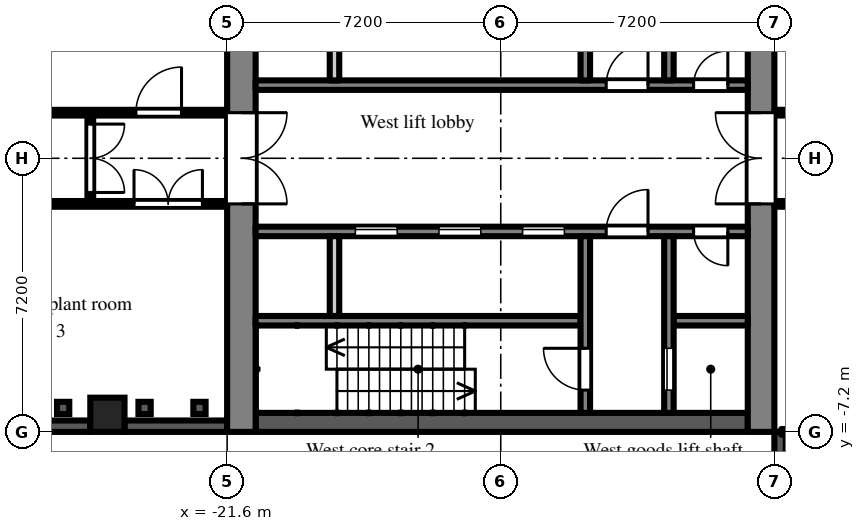
"""IFC4 building model, lengths in metres.
Left out: names, types, materials, properties, quantities, classifications, styles, units other than length and angle.
Written with IfcOpenShell. Run it as: python <this file> out.ifc"""

import sys

from ifc_helpers import new_model, si_unit, direction, frame, frame_2d, origin, origin_2d, place, context, subcontext, project, spatial, rectangle, extrude, element, fill, save


model = new_model("IFC4")
c1 = context("Model", 3, precision=1e-05, world=origin(), true_north=direction((0.0, 1.0)))
c2 = subcontext(c1, "Body", "Model", "MODEL_VIEW")
j1 = project(units=[si_unit("LENGTHUNIT", "METRE"), si_unit("PLANEANGLEUNIT", "RADIAN")], contexts=[c1])
p1 = place(None, origin())
s1 = spatial("IfcSite", under=j1, at=p1, CompositionType="ELEMENT")
p2 = place(p1, origin())
s2 = spatial("IfcBuilding", under=s1, at=p2, CompositionType="ELEMENT")
p3 = place(p2, frame((0.0, 0.0, 111.9)))
s3 = spatial("IfcBuildingStorey", under=s2, at=p3, CompositionType="ELEMENT", Elevation=111.9)
p4 = place(p3, frame((-24.75, -6.75, 0.0), z_axis=(0.0, 0.0, 1.0), x_axis=(1.0, 0.0, 0.0)))
e1 = element("IfcColumn", 1, at=p4, inside=s3, PredefinedType="COLUMN", context=c2, shape_type="SweptSolid", body=[
    extrude(rectangle(XDim=0.9, YDim=0.9, at=origin_2d()), origin(), (0.0, 0.0, 1.0), 4.2),
])
p5 = place(p3, frame((-28.35, -7.05, 0.0), z_axis=(0.0, 0.0, 1.0), x_axis=(1.0, 0.0, 0.0)))
e2 = element("IfcWall", 2, at=p5, inside=s3, PredefinedType="SOLIDWALL", context=c2, shape_type="SweptSolid", body=[
    extrude(rectangle(XDim=3.15, YDim=0.3, at=frame_2d((1.575, 0.0))), origin(), (0.0, 0.0, 1.0), 3.4),
])
p6 = place(p3, frame((-24.3, -7.05, 0.0), z_axis=(0.0, 0.0, 1.0), x_axis=(1.0, 0.0, 0.0)))
e3 = element("IfcWall", 3, at=p6, inside=s3, PredefinedType="SOLIDWALL", context=c2, shape_type="SweptSolid", body=[
    extrude(rectangle(XDim=2.7, YDim=0.3, at=frame_2d((1.35, 0.0))), origin(), (0.0, 0.0, 1.0), 3.4),
])
p7 = place(p3, frame((-7.05, -7.2, 0.0), z_axis=(0.0, 0.0, 1.0), x_axis=(0.0, -1.0, 0.0)))
e4 = element("IfcWall", 4, at=p7, inside=s3, PredefinedType="SOLIDWALL", context=c2, shape_type="SweptSolid", body=[
    extrude(rectangle(XDim=7.2, YDim=0.3, at=frame_2d((3.6, 0.0))), origin(), (0.0, 0.0, 1.0), 3.8),
])
p8 = place(p3, frame((-7.55, -7.2, 0.0), z_axis=(0.0, 0.0, 1.0), x_axis=(0.0, 1.0, 0.0)))
e5 = element("IfcWall", 5, at=p8, inside=s3, PredefinedType="SHEAR", context=c2, shape_type="SweptSolid", body=[
    extrude(rectangle(XDim=14.4, YDim=0.7, at=frame_2d((7.2, 0.0))), origin(), (0.0, 0.0, 1.0), 3.8),
])
p9 = place(p8, frame((6.0, 0.0, 0.0)))
e6 = element("IfcOpeningElement", 6, at=p9, cuts=e5, PredefinedType="OPENING", context=c2, shape_type="SweptSolid", body=[
    extrude(rectangle(XDim=2.4, YDim=2.2, at=frame_2d((1.2, 1.1))), frame((0.0, 0.36, 0.0), z_axis=(0.0, -1.0, 0.0), x_axis=(1.0, 0.0, 0.0)), (0.0, 0.0, 1.0), 0.72),
])
p10 = place(p3, frame((-21.225, -7.2, 0.0), z_axis=(0.0, 0.0, 1.0), x_axis=(0.0, 1.0, 0.0)))
e7 = element("IfcWall", 7, at=p10, inside=s3, PredefinedType="SHEAR", context=c2, shape_type="SweptSolid", body=[
    extrude(rectangle(XDim=14.4, YDim=0.75, at=frame_2d((7.2, 0.0))), origin(), (0.0, 0.0, 1.0), 3.8),
])
p11 = place(p10, frame((6.0, 0.0, 0.0)))
e8 = element("IfcOpeningElement", 8, at=p11, cuts=e7, PredefinedType="OPENING", context=c2, shape_type="SweptSolid", body=[
    extrude(rectangle(XDim=2.4, YDim=2.2, at=frame_2d((1.2, 1.1))), frame((0.0, 0.385, 0.0), z_axis=(0.0, -1.0, 0.0), x_axis=(1.0, 0.0, 0.0)), (0.0, 0.0, 1.0), 0.77),
])
p12 = place(p3, frame((-7.9, 1.925, 0.0), z_axis=(0.0, 0.0, 1.0), x_axis=(-1.0, 0.0, 0.0)))
e9 = element("IfcWall", 9, at=p12, inside=s3, PredefinedType="SHEAR", context=c2, shape_type="SweptSolid", body=[
    extrude(rectangle(XDim=12.95, YDim=0.25, at=frame_2d((6.475, 0.0))), origin(), (0.0, 0.0, 1.0), 3.8),
])
p13 = place(p12, frame((0.525, 0.0, 0.0)))
e10 = element("IfcOpeningElement", 10, at=p13, cuts=e9, PredefinedType="OPENING", context=c2, shape_type="SweptSolid", body=[
    extrude(rectangle(XDim=0.9, YDim=2.1, at=frame_2d((0.45, 1.05))), frame((0.0, 0.135, 0.0), z_axis=(0.0, -1.0, 0.0), x_axis=(1.0, 0.0, 0.0)), (0.0, 0.0, 1.0), 0.27),
])
p14 = place(p12, frame((2.625, 0.0, 0.0)))
e11 = element("IfcOpeningElement", 11, at=p14, cuts=e9, PredefinedType="OPENING", context=c2, shape_type="SweptSolid", body=[
    extrude(rectangle(XDim=1.1, YDim=2.1, at=frame_2d((0.55, 1.05))), frame((0.0, 0.135, 0.0), z_axis=(0.0, -1.0, 0.0), x_axis=(1.0, 0.0, 0.0)), (0.0, 0.0, 1.0), 0.27),
])
p15 = place(p3, frame((-9.975, 2.05, 0.0), z_axis=(0.0, 0.0, 1.0), x_axis=(0.0, 1.0, 0.0)))
e12 = element("IfcWall", 12, at=p15, inside=s3, PredefinedType="SHEAR", context=c2, shape_type="SweptSolid", body=[
    extrude(rectangle(XDim=4.65, YDim=0.25, at=frame_2d((2.325, 0.0))), origin(), (0.0, 0.0, 1.0), 3.8),
])
p16 = place(p15, frame((2.95, 0.0, 0.0)))
e13 = element("IfcOpeningElement", 13, at=p16, cuts=e12, PredefinedType="OPENING", context=c2, shape_type="SweptSolid", body=[
    extrude(rectangle(XDim=1.1, YDim=2.1, at=frame_2d((0.55, 1.05))), frame((0.0, 0.135, 0.0), z_axis=(0.0, -1.0, 0.0), x_axis=(1.0, 0.0, 0.0)), (0.0, 0.0, 1.0), 0.27),
])
p17 = place(p3, frame((-12.175, 2.05, 0.0), z_axis=(0.0, 0.0, 1.0), x_axis=(0.0, 1.0, 0.0)))
e14 = element("IfcWall", 14, at=p17, inside=s3, PredefinedType="SHEAR", context=c2, shape_type="SweptSolid", body=[
    extrude(rectangle(XDim=4.65, YDim=0.25, at=frame_2d((2.325, 0.0))), origin(), (0.0, 0.0, 1.0), 3.8),
])
p18 = place(p17, frame((2.95, 0.0, 0.0)))
e15 = element("IfcOpeningElement", 15, at=p18, cuts=e14, PredefinedType="OPENING", context=c2, shape_type="SweptSolid", body=[
    extrude(rectangle(XDim=1.1, YDim=2.1, at=frame_2d((0.55, 1.05))), frame((0.0, 0.135, 0.0), z_axis=(0.0, -1.0, 0.0), x_axis=(1.0, 0.0, 0.0)), (0.0, 0.0, 1.0), 0.27),
])
p19 = place(p3, frame((-18.775, 2.05, 0.0), z_axis=(0.0, 0.0, 1.0), x_axis=(0.0, 1.0, 0.0)))
e16 = element("IfcWall", 16, at=p19, inside=s3, PredefinedType="PARTITIONING", context=c2, shape_type="SweptSolid", body=[
    extrude(rectangle(XDim=2.1, YDim=0.25, at=frame_2d((1.05, 0.0))), origin(), (0.0, 0.0, 1.0), 3.8),
])
p20 = place(p3, frame((-7.9, -6.95, 0.0), z_axis=(0.0, 0.0, 1.0), x_axis=(-1.0, 0.0, 0.0)))
e17 = element("IfcWall", 17, at=p20, inside=s3, PredefinedType="SHEAR", context=c2, shape_type="SweptSolid", body=[
    extrude(rectangle(XDim=12.95, YDim=0.5, at=frame_2d((6.475, 0.0))), origin(), (0.0, 0.0, 1.0), 3.8),
])
p21 = place(p3, frame((-7.9, -1.925, 0.0), z_axis=(0.0, 0.0, 1.0), x_axis=(-1.0, 0.0, 0.0)))
e18 = element("IfcWall", 18, at=p21, inside=s3, PredefinedType="SHEAR", context=c2, shape_type="SweptSolid", body=[
    extrude(rectangle(XDim=12.95, YDim=0.25, at=frame_2d((6.475, 0.0))), origin(), (0.0, 0.0, 1.0), 3.8),
])
p22 = place(p21, frame((4.825, 0.0, 0.0)))
e19 = element("IfcOpeningElement", 19, at=p22, cuts=e18, PredefinedType="OPENING", context=c2, shape_type="SweptSolid", body=[
    extrude(rectangle(XDim=1.1, YDim=2.1, at=frame_2d((0.55, 1.05))), frame((0.0, 0.135, 0.0), z_axis=(0.0, -1.0, 0.0), x_axis=(1.0, 0.0, 0.0)), (0.0, 0.0, 1.0), 0.27),
])
p23 = place(p21, frame((7.025, 0.0, 0.0)))
e20 = element("IfcOpeningElement", 20, at=p23, cuts=e18, PredefinedType="OPENING", context=c2, shape_type="SweptSolid", body=[
    extrude(rectangle(XDim=1.1, YDim=2.1, at=frame_2d((0.55, 1.05))), frame((0.0, 0.135, 0.0), z_axis=(0.0, -1.0, 0.0), x_axis=(1.0, 0.0, 0.0)), (0.0, 0.0, 1.0), 0.27),
])
p24 = place(p21, frame((9.225, 0.0, 0.0)))
e21 = element("IfcOpeningElement", 21, at=p24, cuts=e18, PredefinedType="OPENING", context=c2, shape_type="SweptSolid", body=[
    extrude(rectangle(XDim=1.1, YDim=2.1, at=frame_2d((0.55, 1.05))), frame((0.0, 0.135, 0.0), z_axis=(0.0, -1.0, 0.0), x_axis=(1.0, 0.0, 0.0)), (0.0, 0.0, 1.0), 0.27),
])
p25 = place(p21, frame((0.525, 0.0, 0.0)))
e22 = element("IfcOpeningElement", 22, at=p25, cuts=e18, PredefinedType="OPENING", context=c2, shape_type="SweptSolid", body=[
    extrude(rectangle(XDim=0.9, YDim=2.1, at=frame_2d((0.45, 1.05))), frame((0.0, 0.135, 0.0), z_axis=(0.0, -1.0, 0.0), x_axis=(1.0, 0.0, 0.0)), (0.0, 0.0, 1.0), 0.27),
])
p26 = place(p21, frame((2.625, 0.0, 0.0)))
e23 = element("IfcOpeningElement", 23, at=p26, cuts=e18, PredefinedType="OPENING", context=c2, shape_type="SweptSolid", body=[
    extrude(rectangle(XDim=1.1, YDim=2.1, at=frame_2d((0.55, 1.05))), frame((0.0, 0.135, 0.0), z_axis=(0.0, -1.0, 0.0), x_axis=(1.0, 0.0, 0.0)), (0.0, 0.0, 1.0), 0.27),
])
p27 = place(p3, frame((-7.9, -4.275, 0.0), z_axis=(0.0, 0.0, 1.0), x_axis=(-1.0, 0.0, 0.0)))
e24 = element("IfcWall", 24, at=p27, inside=s3, PredefinedType="SHEAR", context=c2, shape_type="SweptSolid", body=[
    extrude(rectangle(XDim=1.95, YDim=0.25, at=frame_2d((0.975, 0.0))), origin(), (0.0, 0.0, 1.0), 3.8),
])
p28 = place(p3, frame((-12.3, -4.275, 0.0), z_axis=(0.0, 0.0, 1.0), x_axis=(-1.0, 0.0, 0.0)))
e25 = element("IfcWall", 25, at=p28, inside=s3, PredefinedType="SHEAR", context=c2, shape_type="SweptSolid", body=[
    extrude(rectangle(XDim=8.55, YDim=0.25, at=frame_2d((4.275, 0.0))), origin(), (0.0, 0.0, 1.0), 3.8),
])
p29 = place(p3, frame((-9.975, -2.05, 0.0), z_axis=(0.0, 0.0, 1.0), x_axis=(0.0, -1.0, 0.0)))
e26 = element("IfcWall", 26, at=p29, inside=s3, PredefinedType="SHEAR", context=c2, shape_type="SweptSolid", body=[
    extrude(rectangle(XDim=4.65, YDim=0.25, at=frame_2d((2.325, 0.0))), origin(), (0.0, 0.0, 1.0), 3.8),
])
p30 = place(p29, frame((2.95, 0.0, 0.0)))
e27 = element("IfcOpeningElement", 27, at=p30, cuts=e26, PredefinedType="OPENING", context=c2, shape_type="SweptSolid", body=[
    extrude(rectangle(XDim=1.1, YDim=2.1, at=frame_2d((0.55, 1.05))), frame((0.0, 0.135, 0.0), z_axis=(0.0, -1.0, 0.0), x_axis=(1.0, 0.0, 0.0)), (0.0, 0.0, 1.0), 0.27),
])
p31 = place(p3, frame((-12.175, -2.05, 0.0), z_axis=(0.0, 0.0, 1.0), x_axis=(0.0, -1.0, 0.0)))
e28 = element("IfcWall", 28, at=p31, inside=s3, PredefinedType="SHEAR", context=c2, shape_type="SweptSolid", body=[
    extrude(rectangle(XDim=4.65, YDim=0.25, at=frame_2d((2.325, 0.0))), origin(), (0.0, 0.0, 1.0), 3.8),
])
p32 = place(p31, frame((2.95, 0.0, 0.0)))
e29 = element("IfcOpeningElement", 29, at=p32, cuts=e28, PredefinedType="OPENING", context=c2, shape_type="SweptSolid", body=[
    extrude(rectangle(XDim=1.1, YDim=2.1, at=frame_2d((0.55, 1.05))), frame((0.0, 0.135, 0.0), z_axis=(0.0, -1.0, 0.0), x_axis=(1.0, 0.0, 0.0)), (0.0, 0.0, 1.0), 0.27),
])
p33 = place(p3, frame((-18.775, -2.05, 0.0), z_axis=(0.0, 0.0, 1.0), x_axis=(0.0, -1.0, 0.0)))
e30 = element("IfcWall", 30, at=p33, inside=s3, PredefinedType="PARTITIONING", context=c2, shape_type="SweptSolid", body=[
    extrude(rectangle(XDim=2.1, YDim=0.25, at=frame_2d((1.05, 0.0))), origin(), (0.0, 0.0, 1.0), 3.8),
])
p34 = place(p3, frame((-36.5, -1.2, 0.0), z_axis=(0.0, 0.0, 1.0), x_axis=(1.0, 0.0, 0.0)))
e31 = element("IfcWall", 31, at=p34, inside=s3, PredefinedType="PARTITIONING", context=c2, shape_type="SweptSolid", body=[
    extrude(rectangle(XDim=14.9, YDim=0.15, at=frame_2d((7.45, 0.0))), origin(), (0.0, 0.0, 1.0), 3.8),
])
p35 = place(p34, frame((6.8, 0.0, 0.0)))
e32 = element("IfcOpeningElement", 32, at=p35, cuts=e31, PredefinedType="OPENING", context=c2, shape_type="SweptSolid", body=[
    extrude(rectangle(XDim=1.8, YDim=2.1, at=frame_2d((0.9, 1.05))), frame((0.0, 0.085, 0.0), z_axis=(0.0, -1.0, 0.0), x_axis=(1.0, 0.0, 0.0)), (0.0, 0.0, 1.0), 0.17),
])
p36 = place(p34, frame((12.45, 0.0, 0.0)))
e33 = element("IfcOpeningElement", 33, at=p36, cuts=e31, PredefinedType="OPENING", context=c2, shape_type="SweptSolid", body=[
    extrude(rectangle(XDim=1.8, YDim=2.1, at=frame_2d((0.9, 1.05))), frame((0.0, 0.085, 0.0), z_axis=(0.0, -1.0, 0.0), x_axis=(1.0, 0.0, 0.0)), (0.0, 0.0, 1.0), 0.17),
])
p37 = place(p34, frame((1.15, 0.0, 0.0)))
e34 = element("IfcOpeningElement", 34, at=p37, cuts=e31, PredefinedType="OPENING", context=c2, shape_type="SweptSolid", body=[
    extrude(rectangle(XDim=1.8, YDim=2.1, at=frame_2d((0.9, 1.05))), frame((0.0, 0.085, 0.0), z_axis=(0.0, -1.0, 0.0), x_axis=(1.0, 0.0, 0.0)), (0.0, 0.0, 1.0), 0.17),
])
p38 = place(p3, frame((-36.5, 1.2, 0.0), z_axis=(0.0, 0.0, 1.0), x_axis=(1.0, 0.0, 0.0)))
e35 = element("IfcWall", 35, at=p38, inside=s3, PredefinedType="PARTITIONING", context=c2, shape_type="SweptSolid", body=[
    extrude(rectangle(XDim=14.9, YDim=0.15, at=frame_2d((7.45, 0.0))), origin(), (0.0, 0.0, 1.0), 3.8),
])
p39 = place(p38, frame((4.75, 0.0, 0.0)))
e36 = element("IfcOpeningElement", 36, at=p39, cuts=e35, PredefinedType="OPENING", context=c2, shape_type="SweptSolid", body=[
    extrude(rectangle(XDim=0.9, YDim=2.1, at=frame_2d((0.45, 1.05))), frame((0.0, 0.085, 0.0), z_axis=(0.0, -1.0, 0.0), x_axis=(1.0, 0.0, 0.0)), (0.0, 0.0, 1.0), 0.17),
])
p40 = place(p38, frame((12.5, 0.0, 0.0)))
e37 = element("IfcOpeningElement", 37, at=p40, cuts=e35, PredefinedType="OPENING", context=c2, shape_type="SweptSolid", body=[
    extrude(rectangle(XDim=1.2, YDim=2.1, at=frame_2d((0.6, 1.05))), frame((0.0, 0.085, 0.0), z_axis=(0.0, -1.0, 0.0), x_axis=(1.0, 0.0, 0.0)), (0.0, 0.0, 1.0), 0.17),
])
p41 = place(p38, frame((1.15, 0.0, 0.0)))
e38 = element("IfcOpeningElement", 38, at=p41, cuts=e35, PredefinedType="OPENING", context=c2, shape_type="SweptSolid", body=[
    extrude(rectangle(XDim=1.8, YDim=2.1, at=frame_2d((0.9, 1.05))), frame((0.0, 0.085, 0.0), z_axis=(0.0, -1.0, 0.0), x_axis=(1.0, 0.0, 0.0)), (0.0, 0.0, 1.0), 0.17),
])
p42 = place(p3, frame((-25.2, -1.125, 0.0), z_axis=(0.0, 0.0, 1.0), x_axis=(0.0, 1.0, 0.0)))
e39 = element("IfcWall", 39, at=p42, inside=s3, PredefinedType="PARTITIONING", context=c2, shape_type="SweptSolid", body=[
    extrude(rectangle(XDim=2.25, YDim=0.15, at=frame_2d((1.125, 0.0))), origin(), (0.0, 0.0, 1.0), 3.8),
])
p43 = place(p42, frame((0.225, 0.0, 0.0)))
e40 = element("IfcOpeningElement", 40, at=p43, cuts=e39, PredefinedType="OPENING", context=c2, shape_type="SweptSolid", body=[
    extrude(rectangle(XDim=1.8, YDim=2.1, at=frame_2d((0.9, 1.05))), frame((0.0, 0.085, 0.0), z_axis=(0.0, -1.0, 0.0), x_axis=(1.0, 0.0, 0.0)), (0.0, 0.0, 1.0), 0.17),
])
p44 = place(p3, frame((-7.2, -1.2, 0.0), z_axis=(0.0, 0.0, 1.0), x_axis=(1.0, 0.0, 0.0)))
e41 = element("IfcWall", 41, at=p44, inside=s3, PredefinedType="PARTITIONING", context=c2, shape_type="SweptSolid", body=[
    extrude(rectangle(XDim=5.925, YDim=0.15, at=frame_2d((2.962, 0.0))), origin(), (0.0, 0.0, 1.0), 3.8),
])
p45 = place(p44, frame((0.85, 0.0, 0.0)))
e42 = element("IfcOpeningElement", 42, at=p45, cuts=e41, PredefinedType="OPENING", context=c2, shape_type="SweptSolid", body=[
    extrude(rectangle(XDim=1.2, YDim=2.1, at=frame_2d((0.6, 1.05))), frame((0.0, 0.085, 0.0), z_axis=(0.0, -1.0, 0.0), x_axis=(1.0, 0.0, 0.0)), (0.0, 0.0, 1.0), 0.17),
])
p46 = place(p3, frame((-7.2, 1.2, 0.0), z_axis=(0.0, 0.0, 1.0), x_axis=(1.0, 0.0, 0.0)))
e43 = element("IfcWall", 43, at=p46, inside=s3, PredefinedType="PARTITIONING", context=c2, shape_type="SweptSolid", body=[
    extrude(rectangle(XDim=5.925, YDim=0.15, at=frame_2d((2.962, 0.0))), origin(), (0.0, 0.0, 1.0), 3.8),
])
p47 = place(p46, frame((0.65, 0.0, 0.0)))
e44 = element("IfcOpeningElement", 44, at=p47, cuts=e43, PredefinedType="OPENING", context=c2, shape_type="SweptSolid", body=[
    extrude(rectangle(XDim=1.2, YDim=2.1, at=frame_2d((0.6, 1.05))), frame((0.0, 0.085, 0.0), z_axis=(0.0, -1.0, 0.0), x_axis=(1.0, 0.0, 0.0)), (0.0, 0.0, 1.0), 0.17),
])
p48 = place(p46, frame((4.925, 0.0, 0.0)))
e45 = element("IfcOpeningElement", 45, at=p48, cuts=e43, PredefinedType="OPENING", context=c2, shape_type="SweptSolid", body=[
    extrude(rectangle(XDim=0.9, YDim=2.1, at=frame_2d((0.45, 1.05))), frame((0.0, 0.085, 0.0), z_axis=(0.0, -1.0, 0.0), x_axis=(1.0, 0.0, 0.0)), (0.0, 0.0, 1.0), 0.17),
])
p49 = place(p3, frame((-7.02, -7.2, 0.0), z_axis=(0.0, 0.0, 1.0), x_axis=(1.0, 0.0, 0.0)))
e46 = element("IfcWall", 46, at=p49, inside=s3, PredefinedType="PARTITIONING", context=c2, shape_type="SweptSolid", body=[
    extrude(rectangle(XDim=3.27, YDim=0.15, at=frame_2d((1.635, 0.0))), origin(), (0.0, 0.0, 1.0), 3.4),
])
p50 = place(p22, origin())
e47 = element("IfcDoor", 47, at=p50, inside=s3, OperationType="SLIDING_TO_LEFT", PredefinedType="DOOR", context=c2, shape_type="SweptSolid", body=[
    extrude(rectangle(XDim=1.1, YDim=2.1, at=frame_2d((0.55, 1.05))), frame((0.0, 0.025, 0.0), z_axis=(0.0, -1.0, 0.0), x_axis=(1.0, 0.0, 0.0)), (0.0, 0.0, 1.0), 0.05),
])
fill(e19, e47)
p51 = place(p23, origin())
e48 = element("IfcDoor", 48, at=p51, inside=s3, OperationType="SLIDING_TO_LEFT", PredefinedType="DOOR", context=c2, shape_type="SweptSolid", body=[
    extrude(rectangle(XDim=1.1, YDim=2.1, at=frame_2d((0.55, 1.05))), frame((0.0, 0.025, 0.0), z_axis=(0.0, -1.0, 0.0), x_axis=(1.0, 0.0, 0.0)), (0.0, 0.0, 1.0), 0.05),
])
fill(e20, e48)
p52 = place(p24, origin())
e49 = element("IfcDoor", 49, at=p52, inside=s3, OperationType="SLIDING_TO_LEFT", PredefinedType="DOOR", context=c2, shape_type="SweptSolid", body=[
    extrude(rectangle(XDim=1.1, YDim=2.1, at=frame_2d((0.55, 1.05))), frame((0.0, 0.025, 0.0), z_axis=(0.0, -1.0, 0.0), x_axis=(1.0, 0.0, 0.0)), (0.0, 0.0, 1.0), 0.05),
])
fill(e21, e49)
p53 = place(p30, origin())
e50 = element("IfcDoor", 50, at=p53, inside=s3, OperationType="SLIDING_TO_LEFT", PredefinedType="DOOR", context=c2, shape_type="SweptSolid", body=[
    extrude(rectangle(XDim=1.1, YDim=2.1, at=frame_2d((0.55, 1.05))), frame((0.0, 0.025, 0.0), z_axis=(0.0, -1.0, 0.0), x_axis=(1.0, 0.0, 0.0)), (0.0, 0.0, 1.0), 0.05),
])
fill(e27, e50)
p54 = place(p32, frame((1.1, 0.0, 0.0), z_axis=(0.0, 0.0, 1.0), x_axis=(-1.0, 0.0, 0.0)))
e51 = element("IfcDoor", 51, at=p54, inside=s3, OperationType="SINGLE_SWING_RIGHT", PredefinedType="DOOR", context=c2, shape_type="SweptSolid", body=[
    extrude(rectangle(XDim=1.1, YDim=2.1, at=frame_2d((0.55, 1.05))), frame((0.0, 0.025, 0.0), z_axis=(0.0, -1.0, 0.0), x_axis=(1.0, 0.0, 0.0)), (0.0, 0.0, 1.0), 0.05),
])
fill(e29, e51)
p55 = place(p13, frame((0.9, 0.0, 0.0), z_axis=(0.0, 0.0, 1.0), x_axis=(-1.0, 0.0, 0.0)))
e52 = element("IfcDoor", 52, at=p55, inside=s3, OperationType="SINGLE_SWING_RIGHT", PredefinedType="DOOR", context=c2, shape_type="SweptSolid", body=[
    extrude(rectangle(XDim=0.9, YDim=2.1, at=frame_2d((0.45, 1.05))), frame((0.0, 0.025, 0.0), z_axis=(0.0, -1.0, 0.0), x_axis=(1.0, 0.0, 0.0)), (0.0, 0.0, 1.0), 0.05),
])
fill(e10, e52)
p56 = place(p25, origin())
e53 = element("IfcDoor", 53, at=p56, inside=s3, OperationType="SINGLE_SWING_LEFT", PredefinedType="DOOR", context=c2, shape_type="SweptSolid", body=[
    extrude(rectangle(XDim=0.9, YDim=2.1, at=frame_2d((0.45, 1.05))), frame((0.0, 0.025, 0.0), z_axis=(0.0, -1.0, 0.0), x_axis=(1.0, 0.0, 0.0)), (0.0, 0.0, 1.0), 0.05),
])
fill(e22, e53)
p57 = place(p14, frame((1.1, 0.0, 0.0), z_axis=(0.0, 0.0, 1.0), x_axis=(-1.0, 0.0, 0.0)))
e54 = element("IfcDoor", 54, at=p57, inside=s3, OperationType="SINGLE_SWING_RIGHT", PredefinedType="DOOR", context=c2, shape_type="SweptSolid", body=[
    extrude(rectangle(XDim=1.1, YDim=2.1, at=frame_2d((0.55, 1.05))), frame((0.0, 0.025, 0.0), z_axis=(0.0, -1.0, 0.0), x_axis=(1.0, 0.0, 0.0)), (0.0, 0.0, 1.0), 0.05),
])
fill(e11, e54)
p58 = place(p26, frame((1.1, 0.0, 0.0), z_axis=(0.0, 0.0, 1.0), x_axis=(-1.0, 0.0, 0.0)))
e55 = element("IfcDoor", 55, at=p58, inside=s3, OperationType="SINGLE_SWING_RIGHT", PredefinedType="DOOR", context=c2, shape_type="SweptSolid", body=[
    extrude(rectangle(XDim=1.1, YDim=2.1, at=frame_2d((0.55, 1.05))), frame((0.0, 0.025, 0.0), z_axis=(0.0, -1.0, 0.0), x_axis=(1.0, 0.0, 0.0)), (0.0, 0.0, 1.0), 0.05),
])
fill(e23, e55)
p59 = place(p9, origin())
e56 = element("IfcDoor", 56, at=p59, inside=s3, OperationType="DOUBLE_DOOR_DOUBLE_SWING", PredefinedType="DOOR", context=c2, shape_type="SweptSolid", body=[
    extrude(rectangle(XDim=2.4, YDim=2.2, at=frame_2d((1.2, 1.1))), frame((0.0, 0.025, 0.0), z_axis=(0.0, -1.0, 0.0), x_axis=(1.0, 0.0, 0.0)), (0.0, 0.0, 1.0), 0.05),
])
fill(e6, e56)
p60 = place(p11, frame((2.4, 0.0, 0.0), z_axis=(0.0, 0.0, 1.0), x_axis=(-1.0, 0.0, 0.0)))
e57 = element("IfcDoor", 57, at=p60, inside=s3, OperationType="DOUBLE_DOOR_DOUBLE_SWING", PredefinedType="DOOR", context=c2, shape_type="SweptSolid", body=[
    extrude(rectangle(XDim=2.4, YDim=2.2, at=frame_2d((1.2, 1.1))), frame((0.0, 0.025, 0.0), z_axis=(0.0, -1.0, 0.0), x_axis=(1.0, 0.0, 0.0)), (0.0, 0.0, 1.0), 0.05),
])
fill(e8, e57)
p61 = place(p43, frame((1.8, 0.0, 0.0), z_axis=(0.0, 0.0, 1.0), x_axis=(-1.0, 0.0, 0.0)))
e58 = element("IfcDoor", 58, at=p61, inside=s3, OperationType="DOUBLE_DOOR_DOUBLE_SWING", PredefinedType="DOOR", context=c2, shape_type="SweptSolid", body=[
    extrude(rectangle(XDim=1.8, YDim=2.1, at=frame_2d((0.9, 1.05))), frame((0.0, 0.025, 0.0), z_axis=(0.0, -1.0, 0.0), x_axis=(1.0, 0.0, 0.0)), (0.0, 0.0, 1.0), 0.05),
])
fill(e40, e58)
p62 = place(p36, origin())
e59 = element("IfcDoor", 59, at=p62, inside=s3, OperationType="DOUBLE_DOOR_DOUBLE_SWING", PredefinedType="DOOR", context=c2, shape_type="SweptSolid", body=[
    extrude(rectangle(XDim=1.8, YDim=2.1, at=frame_2d((0.9, 1.05))), frame((0.0, 0.025, 0.0), z_axis=(0.0, -1.0, 0.0), x_axis=(1.0, 0.0, 0.0)), (0.0, 0.0, 1.0), 0.05),
])
fill(e33, e59)
p63 = place(p40, origin())
e60 = element("IfcDoor", 60, at=p63, inside=s3, OperationType="SINGLE_SWING_RIGHT", PredefinedType="DOOR", context=c2, shape_type="SweptSolid", body=[
    extrude(rectangle(XDim=1.2, YDim=2.1, at=frame_2d((0.6, 1.05))), frame((0.0, 0.025, 0.0), z_axis=(0.0, -1.0, 0.0), x_axis=(1.0, 0.0, 0.0)), (0.0, 0.0, 1.0), 0.05),
])
fill(e37, e60)
save(model, sys.argv[1])
